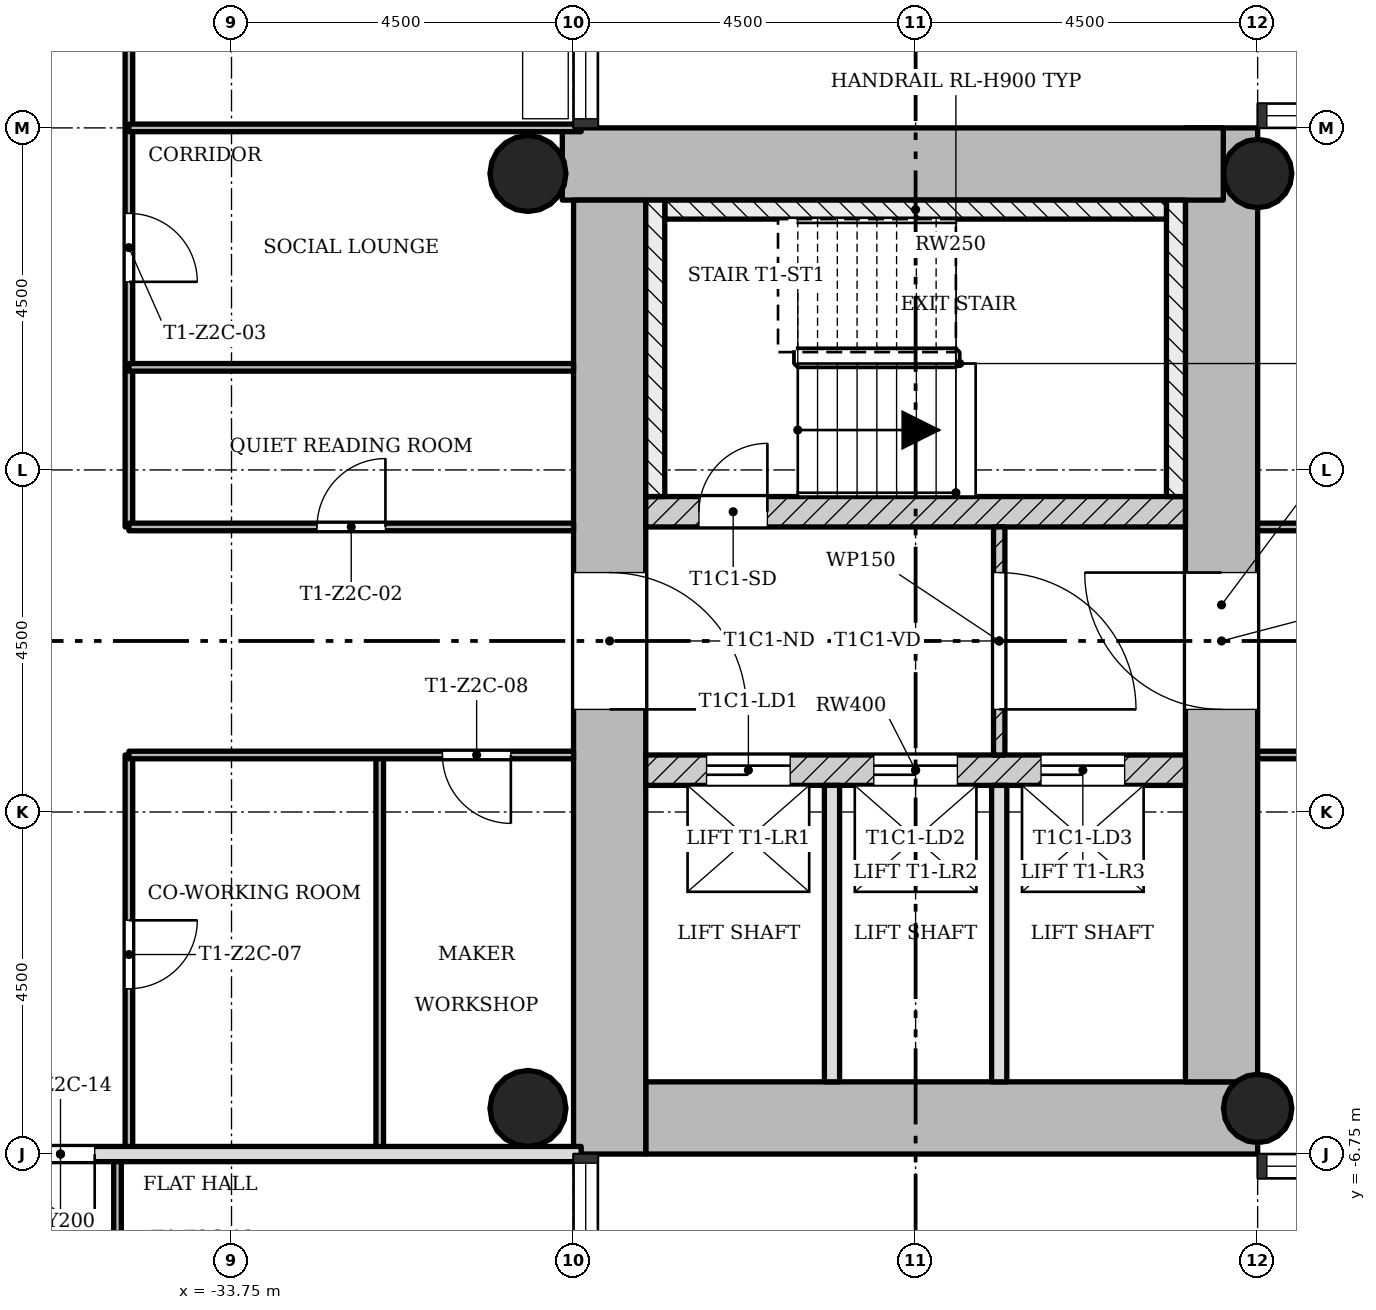
"""IFC4 building model, lengths in metres.
Left out: names, types, materials, properties, quantities, classifications, styles, units other than length and angle.
Written with IfcOpenShell. Run it as: python <this file> out.ifc"""

import sys

from ifc_helpers import new_model, si_unit, direction, frame, frame_2d, origin, origin_2d, place, context, subcontext, project, spatial, rectangle, hollow_circle, extrude, element, fill, save


model = new_model("IFC4")
c1 = context("Model", 3, precision=1e-05, world=origin(), true_north=direction((0.0, 1.0)))
c2 = subcontext(c1, "Body", "Model", "MODEL_VIEW")
j1 = project(units=[si_unit("LENGTHUNIT", "METRE"), si_unit("PLANEANGLEUNIT", "RADIAN")], contexts=[c1])
p1 = place(None, origin())
s1 = spatial("IfcSite", under=j1, at=p1, CompositionType="ELEMENT")
p2 = place(p1, origin())
s2 = spatial("IfcBuilding", under=s1, at=p2, CompositionType="ELEMENT")
p3 = place(p2, frame((0.0, 0.0, 90.2)))
s3 = spatial("IfcBuildingStorey", under=s2, at=p3, CompositionType="ELEMENT", Elevation=90.2)
p4 = place(p3, frame((-28.3, -6.275, 0.0), z_axis=(0.0, 0.0, 1.0), x_axis=(1.0, 0.0, 0.0)))
e1 = element("IfcWall", 1, at=p4, inside=s3, PredefinedType="SHEAR", context=c2, shape_type="SweptSolid", body=[
    extrude(rectangle(XDim=8.05, YDim=0.95, at=frame_2d((4.025, 0.0))), origin(), (0.0, 0.0, 1.0), 3.4),
])
p5 = place(p3, frame((-20.725, -5.8, 0.0), z_axis=(0.0, 0.0, 1.0), x_axis=(0.0, 1.0, 0.0)))
e2 = element("IfcWall", 2, at=p5, inside=s3, PredefinedType="SHEAR", context=c2, shape_type="SweptSolid", body=[
    extrude(rectangle(XDim=12.55, YDim=0.95, at=frame_2d((6.275, 0.0))), origin(), (0.0, 0.0, 1.0), 3.4),
])
p6 = place(p5, frame((4.9, 0.0, 0.0)))
e3 = element("IfcOpeningElement", 3, at=p6, cuts=e2, PredefinedType="OPENING", context=c2, shape_type="SweptSolid", body=[
    extrude(rectangle(XDim=1.8, YDim=2.1, at=frame_2d((0.9, 1.05))), frame((0.0, 0.485, 0.0), z_axis=(0.0, -1.0, 0.0), x_axis=(1.0, 0.0, 0.0)), (0.0, 0.0, 1.0), 0.97),
])
p7 = place(p3, frame((-20.702, 6.275, 0.0), z_axis=(0.0, 0.0, 1.0), x_axis=(-1.0, 0.0, 0.0)))
e4 = element("IfcWall", 4, at=p7, inside=s3, PredefinedType="SHEAR", context=c2, shape_type="SweptSolid", body=[
    extrude(rectangle(XDim=8.696, YDim=0.95, at=frame_2d((4.348, 0.0))), origin(), (0.0, 0.0, 1.0), 3.4),
])
p8 = place(p3, frame((-28.775, 5.8, 0.0), z_axis=(0.0, 0.0, 1.0), x_axis=(0.0, -1.0, 0.0)))
e5 = element("IfcWall", 5, at=p8, inside=s3, PredefinedType="SHEAR", context=c2, shape_type="SweptSolid", body=[
    extrude(rectangle(XDim=12.55, YDim=0.95, at=frame_2d((6.275, 0.0))), origin(), (0.0, 0.0, 1.0), 3.4),
])
p9 = place(p8, frame((4.9, 0.0, 0.0)))
e6 = element("IfcOpeningElement", 6, at=p9, cuts=e5, PredefinedType="OPENING", context=c2, shape_type="SweptSolid", body=[
    extrude(rectangle(XDim=1.8, YDim=2.1, at=frame_2d((0.9, 1.05))), frame((0.0, 0.485, 0.0), z_axis=(0.0, -1.0, 0.0), x_axis=(1.0, 0.0, 0.0)), (0.0, 0.0, 1.0), 0.97),
])
p10 = place(p3, frame((-28.3, -1.7, 0.0), z_axis=(0.0, 0.0, 1.0), x_axis=(1.0, 0.0, 0.0)))
e7 = element("IfcWall", 7, at=p10, inside=s3, PredefinedType="SHEAR", context=c2, shape_type="SweptSolid", body=[
    extrude(rectangle(XDim=7.1, YDim=0.4, at=frame_2d((3.55, 0.0))), origin(), (0.0, 0.0, 1.0), 3.4),
])
p11 = place(p10, frame((0.8, 0.0, 0.0)))
e8 = element("IfcOpeningElement", 8, at=p11, cuts=e7, PredefinedType="OPENING", context=c2, shape_type="SweptSolid", body=[
    extrude(rectangle(XDim=1.1, YDim=2.1, at=frame_2d((0.55, 1.05))), frame((0.0, 0.21, 0.0), z_axis=(0.0, -1.0, 0.0), x_axis=(1.0, 0.0, 0.0)), (0.0, 0.0, 1.0), 0.42),
])
p12 = place(p10, frame((3.0, 0.0, 0.0)))
e9 = element("IfcOpeningElement", 9, at=p12, cuts=e7, PredefinedType="OPENING", context=c2, shape_type="SweptSolid", body=[
    extrude(rectangle(XDim=1.1, YDim=2.1, at=frame_2d((0.55, 1.05))), frame((0.0, 0.21, 0.0), z_axis=(0.0, -1.0, 0.0), x_axis=(1.0, 0.0, 0.0)), (0.0, 0.0, 1.0), 0.42),
])
p13 = place(p10, frame((5.2, 0.0, 0.0)))
e10 = element("IfcOpeningElement", 10, at=p13, cuts=e7, PredefinedType="OPENING", context=c2, shape_type="SweptSolid", body=[
    extrude(rectangle(XDim=1.1, YDim=2.1, at=frame_2d((0.55, 1.05))), frame((0.0, 0.21, 0.0), z_axis=(0.0, -1.0, 0.0), x_axis=(1.0, 0.0, 0.0)), (0.0, 0.0, 1.0), 0.42),
])
p14 = place(p3, frame((-28.3, 1.7, 0.0), z_axis=(0.0, 0.0, 1.0), x_axis=(1.0, 0.0, 0.0)))
e11 = element("IfcWall", 11, at=p14, inside=s3, PredefinedType="SHEAR", context=c2, shape_type="SweptSolid", body=[
    extrude(rectangle(XDim=7.1, YDim=0.4, at=frame_2d((3.55, 0.0))), origin(), (0.0, 0.0, 1.0), 3.4),
])
p15 = place(p14, frame((0.7, 0.0, 0.0)))
e12 = element("IfcOpeningElement", 12, at=p15, cuts=e11, PredefinedType="OPENING", context=c2, shape_type="SweptSolid", body=[
    extrude(rectangle(XDim=0.9, YDim=2.1, at=frame_2d((0.45, 1.05))), frame((0.0, 0.21, 0.0), z_axis=(0.0, -1.0, 0.0), x_axis=(1.0, 0.0, 0.0)), (0.0, 0.0, 1.0), 0.42),
])
for number, where, z_axis, x_axis in (
    (13, (-20.25, -6.15, 0.0), (0.0, 0.0, 1.0), (1.0, 0.0, 0.0)),
    (14, (-20.25, 6.15, 0.0), (0.0, 0.0, 1.0), (1.0, 0.0, 0.0)),
):
    element("IfcColumn", number, at=place(p3, frame(where, z_axis=z_axis, x_axis=x_axis)), inside=s3, PredefinedType="COLUMN", context=c2, shape_type="SweptSolid", body=[
        extrude(hollow_circle(Radius=0.45, WallThickness=0.032, at=origin_2d()), origin(), (0.0, 0.0, 1.0), 3.4),
    ])
for number, where, z_axis, x_axis in (
    (15, (-29.85, -6.15, 0.0), (0.0, 0.0, 1.0), (1.0, 0.0, 0.0)),
    (16, (-29.85, 6.15, 0.0), (0.0, 0.0, 1.0), (1.0, 0.0, 0.0)),
):
    element("IfcColumn", number, at=place(p3, frame(where, z_axis=z_axis, x_axis=x_axis)), inside=s3, PredefinedType="COLUMN", context=c2, shape_type="SweptSolid", body=[
        extrude(hollow_circle(Radius=0.5, WallThickness=0.036, at=origin_2d()), origin(), (0.0, 0.0, 1.0), 3.4),
    ])
p16 = place(p3, frame((-23.65, -1.5, 0.0), z_axis=(0.0, 0.0, 1.0), x_axis=(0.0, 1.0, 0.0)))
e17 = element("IfcWall", 17, at=p16, inside=s3, PredefinedType="PARTITIONING", context=c2, shape_type="SweptSolid", body=[
    extrude(rectangle(XDim=3.0, YDim=0.15, at=frame_2d((1.5, 0.0))), origin(), (0.0, 0.0, 1.0), 3.0),
])
p17 = place(p16, frame((0.6, 0.0, 0.0)))
e18 = element("IfcOpeningElement", 18, at=p17, cuts=e17, PredefinedType="OPENING", context=c2, shape_type="SweptSolid", body=[
    extrude(rectangle(XDim=1.8, YDim=2.1, at=frame_2d((0.9, 1.05))), frame((0.0, 0.085, 0.0), z_axis=(0.0, -1.0, 0.0), x_axis=(1.0, 0.0, 0.0)), (0.0, 0.0, 1.0), 0.17),
])
for number, where, z_axis, x_axis in (
    (19, (-25.85, -5.8, 0.0), (0.0, 0.0, 1.0), (0.0, 1.0, 0.0)),
    (20, (-23.65, -5.8, 0.0), (0.0, 0.0, 1.0), (0.0, 1.0, 0.0)),
):
    element("IfcWall", number, at=place(p3, frame(where, z_axis=z_axis, x_axis=x_axis)), inside=s3, PredefinedType="SOLIDWALL", context=c2, shape_type="SweptSolid", body=[
        extrude(rectangle(XDim=3.9, YDim=0.2, at=frame_2d((1.95, 0.0))), origin(), (0.0, 0.0, 1.0), 3.0),
    ])
p18 = place(p3, frame((-35.25, -11.25, 0.0), z_axis=(0.0, 0.0, 1.0), x_axis=(0.0, 1.0, 0.0)))
e21 = element("IfcWall", 21, at=p18, inside=s3, PredefinedType="PARTITIONING", context=c2, shape_type="SweptSolid", body=[
    extrude(rectangle(XDim=4.5, YDim=0.1, at=frame_2d((2.25, 0.0))), origin(), (0.0, 0.0, 1.0), 3.0),
])
p19 = place(p18, frame((1.8, 0.0, 0.0)))
e22 = element("IfcOpeningElement", 22, at=p19, cuts=e21, PredefinedType="OPENING", context=c2, shape_type="SweptSolid", body=[
    extrude(rectangle(XDim=0.9, YDim=2.1, at=frame_2d((0.45, 1.05))), frame((0.0, 0.06, 0.0), z_axis=(0.0, -1.0, 0.0), x_axis=(1.0, 0.0, 0.0)), (0.0, 0.0, 1.0), 0.12),
])
p20 = place(p3, frame((-35.1, -6.75, 0.0), z_axis=(0.0, 0.0, 1.0), x_axis=(0.0, 1.0, 0.0)))
e23 = element("IfcWall", 23, at=p20, inside=s3, PredefinedType="PARTITIONING", context=c2, shape_type="SweptSolid", body=[
    extrude(rectangle(XDim=5.25, YDim=0.1, at=frame_2d((2.625, 0.0))), origin(), (0.0, 0.0, 1.0), 3.0),
])
p21 = place(p20, frame((2.175, 0.0, 0.0)))
e24 = element("IfcOpeningElement", 24, at=p21, cuts=e23, PredefinedType="OPENING", context=c2, shape_type="SweptSolid", body=[
    extrude(rectangle(XDim=0.9, YDim=2.1, at=frame_2d((0.45, 1.05))), frame((0.0, 0.06, 0.0), z_axis=(0.0, -1.0, 0.0), x_axis=(1.0, 0.0, 0.0)), (0.0, 0.0, 1.0), 0.12),
])
p22 = place(p3, frame((-35.1, 1.5, 0.0), z_axis=(0.0, 0.0, 1.0), x_axis=(0.0, 1.0, 0.0)))
e25 = element("IfcWall", 25, at=p22, inside=s3, PredefinedType="PARTITIONING", context=c2, shape_type="SweptSolid", body=[
    extrude(rectangle(XDim=9.75, YDim=0.1, at=frame_2d((4.875, 0.0))), origin(), (0.0, 0.0, 1.0), 3.0),
])
p23 = place(p22, frame((3.225, 0.0, 0.0)))
e26 = element("IfcOpeningElement", 26, at=p23, cuts=e25, PredefinedType="OPENING", context=c2, shape_type="SweptSolid", body=[
    extrude(rectangle(XDim=0.9, YDim=2.1, at=frame_2d((0.45, 1.05))), frame((0.0, 0.06, 0.0), z_axis=(0.0, -1.0, 0.0), x_axis=(1.0, 0.0, 0.0)), (0.0, 0.0, 1.0), 0.12),
])
p24 = place(p22, frame((7.05, 0.0, 0.0)))
e27 = element("IfcOpeningElement", 27, at=p24, cuts=e25, PredefinedType="OPENING", context=c2, shape_type="SweptSolid", body=[
    extrude(rectangle(XDim=0.9, YDim=2.1, at=frame_2d((0.45, 1.05))), frame((0.0, 0.06, 0.0), z_axis=(0.0, -1.0, 0.0), x_axis=(1.0, 0.0, 0.0)), (0.0, 0.0, 1.0), 0.12),
])
p25 = place(p3, frame((-31.8, -6.75, 0.0), z_axis=(0.0, 0.0, 1.0), x_axis=(0.0, 1.0, 0.0)))
e28 = element("IfcWall", 28, at=p25, inside=s3, PredefinedType="PARTITIONING", context=c2, shape_type="SweptSolid", body=[
    extrude(rectangle(XDim=5.25, YDim=0.1, at=frame_2d((2.625, 0.0))), origin(), (0.0, 0.0, 1.0), 3.0),
])
p26 = place(p3, frame((-42.85, -6.75, 0.0), z_axis=(0.0, 0.0, 1.0), x_axis=(1.0, 0.0, 0.0)))
e29 = element("IfcWall", 29, at=p26, inside=s3, PredefinedType="SOLIDWALL", context=c2, shape_type="SweptSolid", body=[
    extrude(rectangle(XDim=13.7, YDim=0.2, at=frame_2d((6.85, 0.0))), origin(), (0.0, 0.0, 1.0), 3.0),
])
p27 = place(p26, frame((6.4, 0.0, 0.0)))
e30 = element("IfcOpeningElement", 30, at=p27, cuts=e29, PredefinedType="OPENING", context=c2, shape_type="SweptSolid", body=[
    extrude(rectangle(XDim=0.9, YDim=2.1, at=frame_2d((0.45, 1.05))), frame((0.0, 0.11, 0.0), z_axis=(0.0, -1.0, 0.0), x_axis=(1.0, 0.0, 0.0)), (0.0, 0.0, 1.0), 0.22),
])
p28 = place(p3, frame((-35.1, -1.5, 0.0), z_axis=(0.0, 0.0, 1.0), x_axis=(1.0, 0.0, 0.0)))
e31 = element("IfcWall", 31, at=p28, inside=s3, PredefinedType="PARTITIONING", context=c2, shape_type="SweptSolid", body=[
    extrude(rectangle(XDim=5.85, YDim=0.1, at=frame_2d((2.925, 0.0))), origin(), (0.0, 0.0, 1.0), 3.0),
])
p29 = place(p28, frame((4.125, 0.0, 0.0)))
e32 = element("IfcOpeningElement", 32, at=p29, cuts=e31, PredefinedType="OPENING", context=c2, shape_type="SweptSolid", body=[
    extrude(rectangle(XDim=0.9, YDim=2.1, at=frame_2d((0.45, 1.05))), frame((0.0, 0.06, 0.0), z_axis=(0.0, -1.0, 0.0), x_axis=(1.0, 0.0, 0.0)), (0.0, 0.0, 1.0), 0.12),
])
p30 = place(p3, frame((-20.25, -1.5, 0.0), z_axis=(0.0, 0.0, 1.0), x_axis=(1.0, 0.0, 0.0)))
e33 = element("IfcWall", 33, at=p30, inside=s3, PredefinedType="PARTITIONING", context=c2, shape_type="SweptSolid", body=[
    extrude(rectangle(XDim=4.5, YDim=0.1, at=frame_2d((2.25, 0.0))), origin(), (0.0, 0.0, 1.0), 3.0),
])
p31 = place(p30, frame((1.8, 0.0, 0.0)))
e34 = element("IfcOpeningElement", 34, at=p31, cuts=e33, PredefinedType="OPENING", context=c2, shape_type="SweptSolid", body=[
    extrude(rectangle(XDim=0.9, YDim=2.1, at=frame_2d((0.45, 1.05))), frame((0.0, 0.06, 0.0), z_axis=(0.0, -1.0, 0.0), x_axis=(1.0, 0.0, 0.0)), (0.0, 0.0, 1.0), 0.12),
])
p32 = place(p3, frame((-35.1, 1.5, 0.0), z_axis=(0.0, 0.0, 1.0), x_axis=(1.0, 0.0, 0.0)))
e35 = element("IfcWall", 35, at=p32, inside=s3, PredefinedType="PARTITIONING", context=c2, shape_type="SweptSolid", body=[
    extrude(rectangle(XDim=5.85, YDim=0.1, at=frame_2d((2.925, 0.0))), origin(), (0.0, 0.0, 1.0), 3.0),
])
p33 = place(p32, frame((2.475, 0.0, 0.0)))
e36 = element("IfcOpeningElement", 36, at=p33, cuts=e35, PredefinedType="OPENING", context=c2, shape_type="SweptSolid", body=[
    extrude(rectangle(XDim=0.9, YDim=2.1, at=frame_2d((0.45, 1.05))), frame((0.0, 0.06, 0.0), z_axis=(0.0, -1.0, 0.0), x_axis=(1.0, 0.0, 0.0)), (0.0, 0.0, 1.0), 0.12),
])
p34 = place(p3, frame((-20.25, 1.5, 0.0), z_axis=(0.0, 0.0, 1.0), x_axis=(1.0, 0.0, 0.0)))
e37 = element("IfcWall", 37, at=p34, inside=s3, PredefinedType="PARTITIONING", context=c2, shape_type="SweptSolid", body=[
    extrude(rectangle(XDim=4.5, YDim=0.1, at=frame_2d((2.25, 0.0))), origin(), (0.0, 0.0, 1.0), 3.0),
])
p35 = place(p34, frame((1.8, 0.0, 0.0)))
e38 = element("IfcOpeningElement", 38, at=p35, cuts=e37, PredefinedType="OPENING", context=c2, shape_type="SweptSolid", body=[
    extrude(rectangle(XDim=0.9, YDim=2.1, at=frame_2d((0.45, 1.05))), frame((0.0, 0.06, 0.0), z_axis=(0.0, -1.0, 0.0), x_axis=(1.0, 0.0, 0.0)), (0.0, 0.0, 1.0), 0.12),
])
p36 = place(p3, frame((-35.1, 3.6, 0.0), z_axis=(0.0, 0.0, 1.0), x_axis=(1.0, 0.0, 0.0)))
e39 = element("IfcWall", 39, at=p36, inside=s3, PredefinedType="PARTITIONING", context=c2, shape_type="SweptSolid", body=[
    extrude(rectangle(XDim=5.85, YDim=0.1, at=frame_2d((2.925, 0.0))), origin(), (0.0, 0.0, 1.0), 3.0),
])
p37 = place(p3, frame((-35.1, 6.75, 0.0), z_axis=(0.0, 0.0, 1.0), x_axis=(1.0, 0.0, 0.0)))
e40 = element("IfcWall", 40, at=p37, inside=s3, PredefinedType="PARTITIONING", context=c2, shape_type="SweptSolid", body=[
    extrude(rectangle(XDim=5.95, YDim=0.1, at=frame_2d((2.975, 0.0))), origin(), (0.0, 0.0, 1.0), 3.0),
])
p38 = place(p3, frame((-21.325, 1.9, 0.0), z_axis=(0.0, 0.0, 1.0), x_axis=(0.0, 1.0, 0.0)))
e41 = element("IfcWall", 41, at=p38, inside=s3, PredefinedType="SHEAR", context=c2, shape_type="SweptSolid", body=[
    extrude(rectangle(XDim=3.9, YDim=0.25, at=frame_2d((1.95, 0.0))), origin(), (0.0, 0.0, 1.0), 3.4),
])
p39 = place(p3, frame((-28.05, 5.675, 0.0), z_axis=(0.0, 0.0, 1.0), x_axis=(1.0, 0.0, 0.0)))
e42 = element("IfcWall", 42, at=p39, inside=s3, PredefinedType="SHEAR", context=c2, shape_type="SweptSolid", body=[
    extrude(rectangle(XDim=6.6, YDim=0.25, at=frame_2d((3.3, 0.0))), origin(), (0.0, 0.0, 1.0), 3.4),
])
p40 = place(p3, frame((-28.175, 1.9, 0.0), z_axis=(0.0, 0.0, 1.0), x_axis=(0.0, 1.0, 0.0)))
e43 = element("IfcWall", 43, at=p40, inside=s3, PredefinedType="SHEAR", context=c2, shape_type="SweptSolid", body=[
    extrude(rectangle(XDim=3.9, YDim=0.25, at=frame_2d((1.95, 0.0))), origin(), (0.0, 0.0, 1.0), 3.4),
])
p41 = place(p17, origin())
e44 = element("IfcDoor", 44, at=p41, inside=s3, OperationType="SINGLE_SWING_LEFT", PredefinedType="DOOR", context=c2, shape_type="SweptSolid", body=[
    extrude(rectangle(XDim=1.8, YDim=2.1, at=frame_2d((0.9, 1.05))), frame((0.0, 0.025, 0.0), z_axis=(0.0, -1.0, 0.0), x_axis=(1.0, 0.0, 0.0)), (0.0, 0.0, 1.0), 0.05),
])
fill(e18, e44)
p42 = place(p33, origin())
e45 = element("IfcDoor", 45, at=p42, inside=s3, OperationType="SINGLE_SWING_LEFT", PredefinedType="DOOR", context=c2, shape_type="SweptSolid", body=[
    extrude(rectangle(XDim=0.9, YDim=2.1, at=frame_2d((0.45, 1.05))), frame((0.0, 0.025, 0.0), z_axis=(0.0, -1.0, 0.0), x_axis=(1.0, 0.0, 0.0)), (0.0, 0.0, 1.0), 0.05),
])
fill(e36, e45)
p43 = place(p23, origin())
e46 = element("IfcDoor", 46, at=p43, inside=s3, OperationType="SINGLE_SWING_LEFT", PredefinedType="DOOR", context=c2, shape_type="SweptSolid", body=[
    extrude(rectangle(XDim=0.9, YDim=2.1, at=frame_2d((0.45, 1.05))), frame((0.0, 0.025, 0.0), z_axis=(0.0, -1.0, 0.0), x_axis=(1.0, 0.0, 0.0)), (0.0, 0.0, 1.0), 0.05),
])
fill(e26, e46)
p44 = place(p21, origin())
e47 = element("IfcDoor", 47, at=p44, inside=s3, OperationType="SINGLE_SWING_RIGHT", PredefinedType="DOOR", context=c2, shape_type="SweptSolid", body=[
    extrude(rectangle(XDim=0.9, YDim=2.1, at=frame_2d((0.45, 1.05))), frame((0.0, 0.025, 0.0), z_axis=(0.0, -1.0, 0.0), x_axis=(1.0, 0.0, 0.0)), (0.0, 0.0, 1.0), 0.05),
])
fill(e24, e47)
p45 = place(p29, origin())
e48 = element("IfcDoor", 48, at=p45, inside=s3, OperationType="SINGLE_SWING_RIGHT", PredefinedType="DOOR", context=c2, shape_type="SweptSolid", body=[
    extrude(rectangle(XDim=0.9, YDim=2.1, at=frame_2d((0.45, 1.05))), frame((0.0, 0.025, 0.0), z_axis=(0.0, -1.0, 0.0), x_axis=(1.0, 0.0, 0.0)), (0.0, 0.0, 1.0), 0.05),
])
fill(e32, e48)
p46 = place(p27, origin())
e49 = element("IfcDoor", 49, at=p46, inside=s3, OperationType="SINGLE_SWING_RIGHT", PredefinedType="DOOR", context=c2, shape_type="SweptSolid", body=[
    extrude(rectangle(XDim=0.9, YDim=2.1, at=frame_2d((0.45, 1.05))), frame((0.0, 0.025, 0.0), z_axis=(0.0, -1.0, 0.0), x_axis=(1.0, 0.0, 0.0)), (0.0, 0.0, 1.0), 0.05),
])
fill(e30, e49)
p47 = place(p15, origin())
e50 = element("IfcDoor", 50, at=p47, inside=s3, OperationType="SINGLE_SWING_LEFT", PredefinedType="DOOR", context=c2, shape_type="SweptSolid", body=[
    extrude(rectangle(XDim=0.9, YDim=2.1, at=frame_2d((0.45, 1.05))), frame((0.0, 0.025, 0.0), z_axis=(0.0, -1.0, 0.0), x_axis=(1.0, 0.0, 0.0)), (0.0, 0.0, 1.0), 0.05),
])
fill(e12, e50)
p48 = place(p11, origin())
e51 = element("IfcDoor", 51, at=p48, inside=s3, OperationType="SLIDING_TO_LEFT", PredefinedType="DOOR", context=c2, shape_type="SweptSolid", body=[
    extrude(rectangle(XDim=1.1, YDim=2.1, at=frame_2d((0.55, 1.05))), frame((0.0, 0.025, 0.0), z_axis=(0.0, -1.0, 0.0), x_axis=(1.0, 0.0, 0.0)), (0.0, 0.0, 1.0), 0.05),
])
fill(e8, e51)
p49 = place(p12, origin())
e52 = element("IfcDoor", 52, at=p49, inside=s3, OperationType="SLIDING_TO_LEFT", PredefinedType="DOOR", context=c2, shape_type="SweptSolid", body=[
    extrude(rectangle(XDim=1.1, YDim=2.1, at=frame_2d((0.55, 1.05))), frame((0.0, 0.025, 0.0), z_axis=(0.0, -1.0, 0.0), x_axis=(1.0, 0.0, 0.0)), (0.0, 0.0, 1.0), 0.05),
])
fill(e9, e52)
p50 = place(p13, origin())
e53 = element("IfcDoor", 53, at=p50, inside=s3, OperationType="SLIDING_TO_LEFT", PredefinedType="DOOR", context=c2, shape_type="SweptSolid", body=[
    extrude(rectangle(XDim=1.1, YDim=2.1, at=frame_2d((0.55, 1.05))), frame((0.0, 0.025, 0.0), z_axis=(0.0, -1.0, 0.0), x_axis=(1.0, 0.0, 0.0)), (0.0, 0.0, 1.0), 0.05),
])
fill(e10, e53)
p51 = place(p9, origin())
e54 = element("IfcDoor", 54, at=p51, inside=s3, OperationType="SINGLE_SWING_LEFT", PredefinedType="DOOR", context=c2, shape_type="SweptSolid", body=[
    extrude(rectangle(XDim=1.8, YDim=2.1, at=frame_2d((0.9, 1.05))), frame((0.0, 0.025, 0.0), z_axis=(0.0, -1.0, 0.0), x_axis=(1.0, 0.0, 0.0)), (0.0, 0.0, 1.0), 0.05),
])
fill(e6, e54)
p52 = place(p6, origin())
e55 = element("IfcDoor", 55, at=p52, inside=s3, OperationType="SINGLE_SWING_LEFT", PredefinedType="DOOR", context=c2, shape_type="SweptSolid", body=[
    extrude(rectangle(XDim=1.8, YDim=2.1, at=frame_2d((0.9, 1.05))), frame((0.0, 0.025, 0.0), z_axis=(0.0, -1.0, 0.0), x_axis=(1.0, 0.0, 0.0)), (0.0, 0.0, 1.0), 0.05),
])
fill(e3, e55)
save(model, sys.argv[1])
